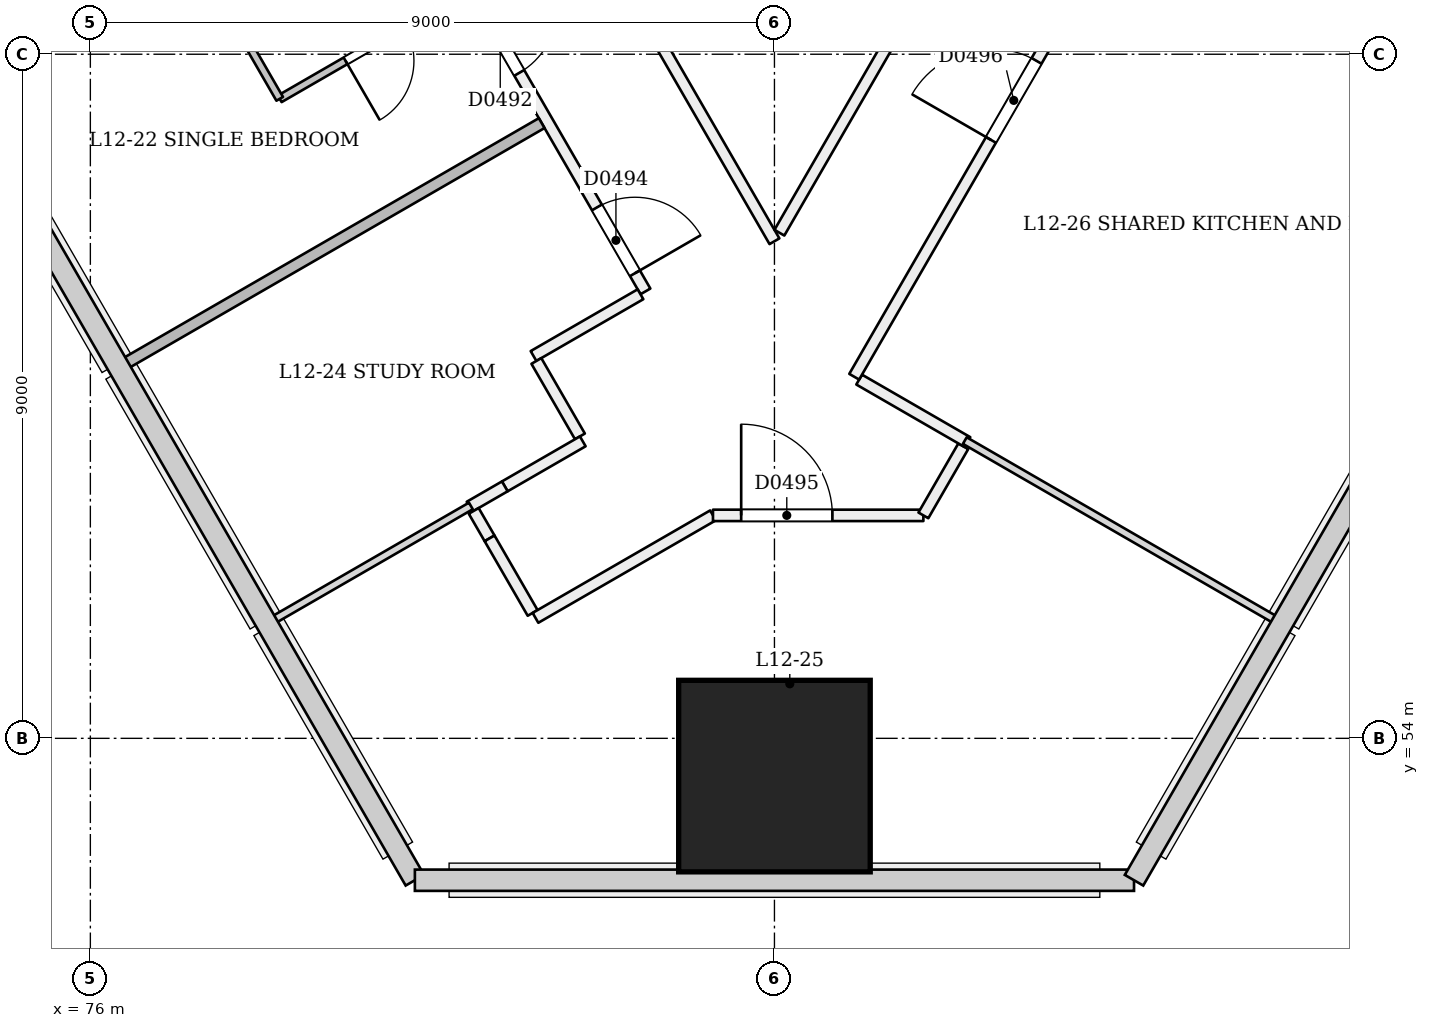
"""IFC4 building model, lengths in metres.
Left out: names, types, materials, properties, quantities, classifications, styles, units other than length and angle.
Written with IfcOpenShell. Run it as: python <this file> out.ifc"""

import sys

from ifc_helpers import new_model, si_unit, direction, frame, frame_2d, origin, origin_2d, place, context, subcontext, project, spatial, rectangle, extrude, element, fill, save


model = new_model("IFC4")
c1 = context("Model", 3, precision=1e-05, world=origin(), true_north=direction((0.0, 1.0)))
c2 = subcontext(c1, "Body", "Model", "MODEL_VIEW")
j1 = project(units=[si_unit("LENGTHUNIT", "METRE"), si_unit("PLANEANGLEUNIT", "RADIAN")], contexts=[c1])
p1 = place(None, origin())
s1 = spatial("IfcSite", under=j1, at=p1, CompositionType="ELEMENT")
p2 = place(p1, origin())
s2 = spatial("IfcBuilding", under=s1, at=p2, CompositionType="ELEMENT")
p3 = place(p2, frame((0.0, 0.0, 52.2)))
s3 = spatial("IfcBuildingStorey", under=s2, at=p3, CompositionType="ELEMENT", Elevation=52.2)
p4 = place(p3, frame((85.0, 53.433, 0.0), z_axis=(0.0, 0.058356907999, 0.998295783467), x_axis=(-1.0, 0.0, 0.0)))
e1 = element("IfcColumn", 1, at=p4, inside=s3, PredefinedType="COLUMN", context=c2, shape_type="SweptSolid", body=[
    extrude(rectangle(XDim=2.52, YDim=2.52, at=origin_2d()), origin(), (0.0, 0.0, 1.0), 3.606),
])
p5 = place(p3, frame((64.002, 93.308, 0.0), z_axis=(0.0, 0.0, 1.0), x_axis=(0.49999948646, -0.866025700277, 0.0)))
e2 = element("IfcWall", 2, at=p5, inside=s3, PredefinedType="PARTITIONING", context=c2, shape_type="SweptSolid", body=[
    extrude(rectangle(XDim=38.6, YDim=0.15, at=frame_2d((19.3, 0.0))), origin(), (0.0, 0.0, 1.0), 2.7),
])
p6 = place(p5, frame((0.605, 0.0, 0.0)))
e3 = element("IfcOpeningElement", 3, at=p6, cuts=e2, PredefinedType="OPENING", context=c2, shape_type="SweptSolid", body=[
    extrude(rectangle(XDim=1.0, YDim=2.1, at=frame_2d((0.5, 1.05))), frame((0.0, 0.085, 0.0), z_axis=(0.0, -1.0, 0.0), x_axis=(1.0, 0.0, 0.0)), (0.0, 0.0, 1.0), 0.171),
])
p7 = place(p5, frame((7.28, 0.0, 0.0)))
e4 = element("IfcOpeningElement", 4, at=p7, cuts=e2, PredefinedType="OPENING", context=c2, shape_type="SweptSolid", body=[
    extrude(rectangle(XDim=1.0, YDim=2.1, at=frame_2d((0.5, 1.05))), frame((0.0, 0.085, 0.0), z_axis=(0.0, -1.0, 0.0), x_axis=(1.0, 0.0, 0.0)), (0.0, 0.0, 1.0), 0.171),
])
p8 = place(p5, frame((9.72, 0.0, 0.0)))
e5 = element("IfcOpeningElement", 5, at=p8, cuts=e2, PredefinedType="OPENING", context=c2, shape_type="SweptSolid", body=[
    extrude(rectangle(XDim=1.0, YDim=2.1, at=frame_2d((0.5, 1.05))), frame((0.0, 0.085, 0.0), z_axis=(0.0, -1.0, 0.0), x_axis=(1.0, 0.0, 0.0)), (0.0, 0.0, 1.0), 0.171),
])
p9 = place(p5, frame((16.395, 0.0, 0.0)))
e6 = element("IfcOpeningElement", 6, at=p9, cuts=e2, PredefinedType="OPENING", context=c2, shape_type="SweptSolid", body=[
    extrude(rectangle(XDim=1.0, YDim=2.1, at=frame_2d((0.5, 1.05))), frame((0.0, 0.085, 0.0), z_axis=(0.0, -1.0, 0.0), x_axis=(1.0, 0.0, 0.0)), (0.0, 0.0, 1.0), 0.171),
])
p10 = place(p5, frame((18.72, 0.0, 0.0)))
e7 = element("IfcOpeningElement", 7, at=p10, cuts=e2, PredefinedType="OPENING", context=c2, shape_type="SweptSolid", body=[
    extrude(rectangle(XDim=1.0, YDim=2.1, at=frame_2d((0.5, 1.05))), frame((0.0, 0.085, 0.0), z_axis=(0.0, -1.0, 0.0), x_axis=(1.0, 0.0, 0.0)), (0.0, 0.0, 1.0), 0.171),
])
p11 = place(p5, frame((25.395, 0.0, 0.0)))
e8 = element("IfcOpeningElement", 8, at=p11, cuts=e2, PredefinedType="OPENING", context=c2, shape_type="SweptSolid", body=[
    extrude(rectangle(XDim=1.0, YDim=2.1, at=frame_2d((0.5, 1.05))), frame((0.0, 0.085, 0.0), z_axis=(0.0, -1.0, 0.0), x_axis=(1.0, 0.0, 0.0)), (0.0, 0.0, 1.0), 0.171),
])
p12 = place(p5, frame((27.605, 0.0, 0.0)))
e9 = element("IfcOpeningElement", 9, at=p12, cuts=e2, PredefinedType="OPENING", context=c2, shape_type="SweptSolid", body=[
    extrude(rectangle(XDim=1.0, YDim=2.1, at=frame_2d((0.5, 1.05))), frame((0.0, 0.085, 0.0), z_axis=(0.0, -1.0, 0.0), x_axis=(1.0, 0.0, 0.0)), (0.0, 0.0, 1.0), 0.171),
])
p13 = place(p5, frame((34.28, 0.0, 0.0)))
e10 = element("IfcOpeningElement", 10, at=p13, cuts=e2, PredefinedType="OPENING", context=c2, shape_type="SweptSolid", body=[
    extrude(rectangle(XDim=1.0, YDim=2.1, at=frame_2d((0.5, 1.05))), frame((0.0, 0.085, 0.0), z_axis=(0.0, -1.0, 0.0), x_axis=(1.0, 0.0, 0.0)), (0.0, 0.0, 1.0), 0.171),
])
p14 = place(p5, frame((37.324, 0.0, 0.0)))
e11 = element("IfcOpeningElement", 11, at=p14, cuts=e2, PredefinedType="OPENING", context=c2, shape_type="SweptSolid", body=[
    extrude(rectangle(XDim=1.0, YDim=2.1, at=frame_2d((0.5, 1.05))), frame((0.0, 0.085, 0.0), z_axis=(0.0, -1.0, 0.0), x_axis=(1.0, 0.0, 0.0)), (0.0, 0.0, 1.0), 0.171),
])
p15 = place(p3, frame((83.238, 59.842, 0.0), z_axis=(0.0, 0.0, 1.0), x_axis=(-0.866015446554, -0.500017246033, 0.0)))
e12 = element("IfcWall", 12, at=p15, inside=s3, PredefinedType="PARTITIONING", context=c2, shape_type="SweptSolid", body=[
    extrude(rectangle(XDim=1.625, YDim=0.15, at=frame_2d((0.812, 0.0))), origin(), (0.0, 0.0, 1.0), 3.1),
])
p16 = place(p3, frame((81.868, 58.965, 0.0), z_axis=(0.0, 0.0, 1.0), x_axis=(0.499919131929, -0.866072087953, 0.0)))
e13 = element("IfcWall", 13, at=p16, inside=s3, PredefinedType="PARTITIONING", context=c2, shape_type="SweptSolid", body=[
    extrude(rectangle(XDim=1.146, YDim=0.15, at=frame_2d((0.573, 0.0))), origin(), (0.0, 0.0, 1.0), 3.1),
])
p17 = place(p3, frame((82.478, 57.907, 0.0), z_axis=(0.0, 0.0, 1.0), x_axis=(-0.866079219153, -0.49990677746, 0.0)))
e14 = element("IfcWall", 14, at=p17, inside=s3, PredefinedType="PARTITIONING", context=c2, shape_type="SweptSolid", body=[
    extrude(rectangle(XDim=1.185, YDim=0.15, at=frame_2d((0.592, 0.0))), origin(), (0.0, 0.0, 1.0), 3.1),
])
p18 = place(p3, frame((81.452, 57.315, 0.0), z_axis=(0.0, 0.0, 1.0), x_axis=(-0.865988023682, -0.500064738649, 0.0)))
e15 = element("IfcWall", 15, at=p18, inside=s3, PredefinedType="PARTITIONING", context=c2, shape_type="SweptSolid", body=[
    extrude(rectangle(XDim=0.535, YDim=0.15, at=frame_2d((0.268, 0.0))), origin(), (0.0, 0.0, 1.0), 2.6),
])
p19 = place(p3, frame((81.044, 56.992, 0.0), z_axis=(0.0, 0.0, 1.0), x_axis=(0.499790003975, -0.866146611104, 0.0)))
e16 = element("IfcWall", 16, at=p19, inside=s3, PredefinedType="PARTITIONING", context=c2, shape_type="SweptSolid", body=[
    extrude(rectangle(XDim=0.417, YDim=0.15, at=frame_2d((0.208, 0.0))), origin(), (0.0, 0.0, 1.0), 2.6),
])
p20 = place(p3, frame((81.252, 56.631, 0.0), z_axis=(0.0, 0.0, 1.0), x_axis=(0.500033399229, -0.866006119872, 0.0)))
e17 = element("IfcWall", 17, at=p20, inside=s3, PredefinedType="PARTITIONING", context=c2, shape_type="SweptSolid", body=[
    extrude(rectangle(XDim=1.133, YDim=0.15, at=frame_2d((0.566, 0.0))), origin(), (0.0, 0.0, 1.0), 3.1),
])
p21 = place(p3, frame((81.856, 55.585, 0.0), z_axis=(0.0, 0.0, 1.0), x_axis=(0.866016698225, 0.500015078168, 0.0)))
e18 = element("IfcWall", 18, at=p21, inside=s3, PredefinedType="PARTITIONING", context=c2, shape_type="SweptSolid", body=[
    extrude(rectangle(XDim=2.696, YDim=0.15, at=frame_2d((1.348, 0.0))), origin(), (0.0, 0.0, 1.0), 2.6),
])
p22 = place(p3, frame((84.191, 56.933, 0.0), z_axis=(0.0, 0.0, 1.0), x_axis=(1.0, 0.0, 0.0)))
e19 = element("IfcWall", 19, at=p22, inside=s3, PredefinedType="PARTITIONING", context=c2, shape_type="SweptSolid", body=[
    extrude(rectangle(XDim=2.768, YDim=0.15, at=frame_2d((1.384, 0.0))), origin(), (0.0, 0.0, 1.0), 3.1),
])
p23 = place(p22, frame((0.371, 0.0, 0.0)))
e20 = element("IfcOpeningElement", 20, at=p23, cuts=e19, PredefinedType="OPENING", context=c2, shape_type="SweptSolid", body=[
    extrude(rectangle(XDim=1.2, YDim=2.1, at=frame_2d((0.6, 1.05))), frame((0.0, 0.085, 0.0), z_axis=(0.0, -1.0, 0.0), x_axis=(1.0, 0.0, 0.0)), (0.0, 0.0, 1.0), 0.171),
])
p24 = place(p3, frame((86.959, 56.933, 0.0), z_axis=(0.0, 0.0, 1.0), x_axis=(0.500091574638, 0.865972526687, 0.0)))
e21 = element("IfcWall", 21, at=p24, inside=s3, PredefinedType="PARTITIONING", context=c2, shape_type="SweptSolid", body=[
    extrude(rectangle(XDim=1.05, YDim=0.15, at=frame_2d((0.525, 0.0))), origin(), (0.0, 0.0, 1.0), 3.1),
])
p25 = place(p3, frame((87.539, 57.897, 0.0), z_axis=(0.0, 0.0, 1.0), x_axis=(-0.866015045157, 0.50001794124, 0.0)))
e22 = element("IfcWall", 22, at=p25, inside=s3, PredefinedType="PARTITIONING", context=c2, shape_type="SweptSolid", body=[
    extrude(rectangle(XDim=1.645, YDim=0.15, at=frame_2d((0.823, 0.0))), origin(), (0.0, 0.0, 1.0), 3.1),
])
p26 = place(p3, frame((86.05, 58.757, 0.0), z_axis=(0.0, 0.0, 1.0), x_axis=(0.499999296855, 0.866025809745, 0.0)))
e23 = element("IfcWall", 23, at=p26, inside=s3, PredefinedType="PARTITIONING", context=c2, shape_type="SweptSolid", body=[
    extrude(rectangle(XDim=43.792, YDim=0.15, at=frame_2d((21.896, 0.0))), origin(), (0.0, 0.0, 1.0), 2.7),
])
p27 = place(p26, frame((3.598, 0.0, 0.0)))
e24 = element("IfcOpeningElement", 24, at=p27, cuts=e23, PredefinedType="OPENING", context=c2, shape_type="SweptSolid", body=[
    extrude(rectangle(XDim=1.2, YDim=2.1, at=frame_2d((0.6, 1.05))), frame((0.0, 0.085, 0.0), z_axis=(0.0, -1.0, 0.0), x_axis=(1.0, 0.0, 0.0)), (0.0, 0.0, 1.0), 0.171),
])
p28 = place(p26, frame((11.176, 0.0, 0.0)))
e25 = element("IfcOpeningElement", 25, at=p28, cuts=e23, PredefinedType="OPENING", context=c2, shape_type="SweptSolid", body=[
    extrude(rectangle(XDim=1.0, YDim=2.1, at=frame_2d((0.5, 1.05))), frame((0.0, 0.085, 0.0), z_axis=(0.0, -1.0, 0.0), x_axis=(1.0, 0.0, 0.0)), (0.0, 0.0, 1.0), 0.171),
])
p29 = place(p26, frame((13.616, 0.0, 0.0)))
e26 = element("IfcOpeningElement", 26, at=p29, cuts=e23, PredefinedType="OPENING", context=c2, shape_type="SweptSolid", body=[
    extrude(rectangle(XDim=1.0, YDim=2.1, at=frame_2d((0.5, 1.05))), frame((0.0, 0.085, 0.0), z_axis=(0.0, -1.0, 0.0), x_axis=(1.0, 0.0, 0.0)), (0.0, 0.0, 1.0), 0.171),
])
p30 = place(p26, frame((20.176, 0.0, 0.0)))
e27 = element("IfcOpeningElement", 27, at=p30, cuts=e23, PredefinedType="OPENING", context=c2, shape_type="SweptSolid", body=[
    extrude(rectangle(XDim=1.0, YDim=2.1, at=frame_2d((0.5, 1.05))), frame((0.0, 0.085, 0.0), z_axis=(0.0, -1.0, 0.0), x_axis=(1.0, 0.0, 0.0)), (0.0, 0.0, 1.0), 0.171),
])
p31 = place(p26, frame((22.616, 0.0, 0.0)))
e28 = element("IfcOpeningElement", 28, at=p31, cuts=e23, PredefinedType="OPENING", context=c2, shape_type="SweptSolid", body=[
    extrude(rectangle(XDim=1.0, YDim=2.1, at=frame_2d((0.5, 1.05))), frame((0.0, 0.085, 0.0), z_axis=(0.0, -1.0, 0.0), x_axis=(1.0, 0.0, 0.0)), (0.0, 0.0, 1.0), 0.171),
])
p32 = place(p26, frame((29.176, 0.0, 0.0)))
e29 = element("IfcOpeningElement", 29, at=p32, cuts=e23, PredefinedType="OPENING", context=c2, shape_type="SweptSolid", body=[
    extrude(rectangle(XDim=1.0, YDim=2.1, at=frame_2d((0.5, 1.05))), frame((0.0, 0.085, 0.0), z_axis=(0.0, -1.0, 0.0), x_axis=(1.0, 0.0, 0.0)), (0.0, 0.0, 1.0), 0.171),
])
p33 = place(p26, frame((31.616, 0.0, 0.0)))
e30 = element("IfcOpeningElement", 30, at=p33, cuts=e23, PredefinedType="OPENING", context=c2, shape_type="SweptSolid", body=[
    extrude(rectangle(XDim=1.0, YDim=2.1, at=frame_2d((0.5, 1.05))), frame((0.0, 0.085, 0.0), z_axis=(0.0, -1.0, 0.0), x_axis=(1.0, 0.0, 0.0)), (0.0, 0.0, 1.0), 0.171),
])
p34 = place(p26, frame((38.176, 0.0, 0.0)))
e31 = element("IfcOpeningElement", 31, at=p34, cuts=e23, PredefinedType="OPENING", context=c2, shape_type="SweptSolid", body=[
    extrude(rectangle(XDim=1.0, YDim=2.1, at=frame_2d((0.5, 1.05))), frame((0.0, 0.085, 0.0), z_axis=(0.0, -1.0, 0.0), x_axis=(1.0, 0.0, 0.0)), (0.0, 0.0, 1.0), 0.171),
])
p35 = place(p26, frame((41.344, 0.0, 0.0)))
e32 = element("IfcOpeningElement", 32, at=p35, cuts=e23, PredefinedType="OPENING", context=c2, shape_type="SweptSolid", body=[
    extrude(rectangle(XDim=1.0, YDim=2.1, at=frame_2d((0.5, 1.05))), frame((0.0, 0.085, 0.0), z_axis=(0.0, -1.0, 0.0), x_axis=(1.0, 0.0, 0.0)), (0.0, 0.0, 1.0), 0.171),
])
p36 = place(p3, frame((85.0, 60.54, 0.0), z_axis=(0.0, 0.0, 1.0), x_axis=(-0.500000084694, 0.866025354886, 0.0)))
e33 = element("IfcWall", 33, at=p36, inside=s3, PredefinedType="PARTITIONING", context=c2, shape_type="SweptSolid", body=[
    extrude(rectangle(XDim=34.711, YDim=0.15, at=frame_2d((17.355, 0.0))), origin(), (0.0, 0.0, 1.0), 3.1),
])
p37 = place(p36, frame((5.966, 0.0, 0.0)))
e34 = element("IfcOpeningElement", 34, at=p37, cuts=e33, PredefinedType="OPENING", context=c2, shape_type="SweptSolid", body=[
    extrude(rectangle(XDim=1.2, YDim=2.1, at=frame_2d((0.6, 1.05))), frame((0.0, 0.085, 0.0), z_axis=(0.0, -1.0, 0.0), x_axis=(1.0, 0.0, 0.0)), (0.0, 0.0, 1.0), 0.171),
])
p38 = place(p36, frame((11.813, 0.0, 0.0)))
e35 = element("IfcOpeningElement", 35, at=p38, cuts=e33, PredefinedType="OPENING", context=c2, shape_type="SweptSolid", body=[
    extrude(rectangle(XDim=1.2, YDim=2.1, at=frame_2d((0.6, 1.05))), frame((0.0, 0.085, 0.0), z_axis=(0.0, -1.0, 0.0), x_axis=(1.0, 0.0, 0.0)), (0.0, 0.0, 1.0), 0.171),
])
p39 = place(p36, frame((25.156, 0.0, 0.0)))
e36 = element("IfcOpeningElement", 36, at=p39, cuts=e33, PredefinedType="OPENING", context=c2, shape_type="SweptSolid", body=[
    extrude(rectangle(XDim=1.2, YDim=2.1, at=frame_2d((0.6, 1.05))), frame((0.0, 0.085, 0.0), z_axis=(0.0, -1.0, 0.0), x_axis=(1.0, 0.0, 0.0)), (0.0, 0.0, 1.0), 0.171),
])
p40 = place(p36, frame((30.288, 0.0, 0.0)))
e37 = element("IfcOpeningElement", 37, at=p40, cuts=e33, PredefinedType="OPENING", context=c2, shape_type="SweptSolid", body=[
    extrude(rectangle(XDim=1.2, YDim=2.1, at=frame_2d((0.6, 1.05))), frame((0.0, 0.085, 0.0), z_axis=(0.0, -1.0, 0.0), x_axis=(1.0, 0.0, 0.0)), (0.0, 0.0, 1.0), 0.171),
])
p41 = place(p36, frame((15.887, 0.0, 0.0)))
e38 = element("IfcOpeningElement", 38, at=p41, cuts=e33, PredefinedType="OPENING", context=c2, shape_type="SweptSolid", body=[
    extrude(rectangle(XDim=1.2, YDim=2.1, at=frame_2d((0.6, 1.05))), frame((0.0, 0.085, 0.0), z_axis=(0.0, -1.0, 0.0), x_axis=(1.0, 0.0, 0.0)), (0.0, 0.0, 1.0), 0.171),
])
p42 = place(p36, frame((19.777, 0.0, 0.0)))
e39 = element("IfcOpeningElement", 39, at=p42, cuts=e33, PredefinedType="OPENING", context=c2, shape_type="SweptSolid", body=[
    extrude(rectangle(XDim=1.2, YDim=2.1, at=frame_2d((0.6, 1.05))), frame((0.0, 0.085, 0.0), z_axis=(0.0, -1.0, 0.0), x_axis=(1.0, 0.0, 0.0)), (0.0, 0.0, 1.0), 0.171),
])
p43 = place(p3, frame((102.355, 90.6, 0.0), z_axis=(0.0, 0.0, 1.0), x_axis=(-0.500000924128, -0.866024870238, 0.0)))
e40 = element("IfcWall", 40, at=p43, inside=s3, PredefinedType="PARTITIONING", context=c2, shape_type="SweptSolid", body=[
    extrude(rectangle(XDim=34.581, YDim=0.15, at=frame_2d((17.291, 0.0))), origin(), (0.0, 0.0, 1.0), 3.1),
])
p44 = place(p43, frame((9.118, 0.0, 0.0)))
e41 = element("IfcOpeningElement", 41, at=p44, cuts=e40, PredefinedType="OPENING", context=c2, shape_type="SweptSolid", body=[
    extrude(rectangle(XDim=1.2, YDim=2.1, at=frame_2d((0.6, 1.05))), frame((0.0, 0.085, 0.0), z_axis=(0.0, -1.0, 0.0), x_axis=(1.0, 0.0, 0.0)), (0.0, 0.0, 1.0), 0.171),
])
p45 = place(p3, frame((74.21, 62.828, 0.0), z_axis=(0.0, 0.0, 1.0), x_axis=(0.866007273829, 0.50003140069, 0.0)))
e42 = element("IfcWall", 42, at=p45, inside=s3, PredefinedType="PARTITIONING", context=c2, shape_type="SweptSolid", body=[
    extrude(rectangle(XDim=3.42, YDim=0.15, at=frame_2d((1.71, 0.0))), origin(), (0.0, 0.0, 1.0), 2.6),
])
p46 = place(p3, frame((80.938, 63.826, 0.0), z_axis=(0.0, 0.0, 1.0), x_axis=(-0.866011447264, -0.500024172624, 0.0)))
e43 = element("IfcWall", 43, at=p46, inside=s3, PredefinedType="PARTITIONING", context=c2, shape_type="SweptSolid", body=[
    extrude(rectangle(XDim=2.825, YDim=0.1, at=frame_2d((1.413, 0.0))), origin(), (0.0, 0.0, 1.0), 3.1),
])
p47 = place(p46, frame((0.925, 0.0, 0.0)))
e44 = element("IfcOpeningElement", 44, at=p47, cuts=e43, PredefinedType="OPENING", context=c2, shape_type="SweptSolid", body=[
    extrude(rectangle(XDim=0.9, YDim=2.1, at=frame_2d((0.45, 1.05))), frame((0.0, 0.061, 0.0), z_axis=(0.0, -1.0, 0.0), x_axis=(1.0, 0.0, 0.0)), (0.0, 0.0, 1.0), 0.121),
])
p48 = place(p3, frame((78.491, 62.413, 0.0), z_axis=(0.0, 0.0, 1.0), x_axis=(-0.500004234368, 0.866022959057, 0.0)))
e45 = element("IfcWall", 45, at=p48, inside=s3, PredefinedType="PARTITIONING", context=c2, shape_type="SweptSolid", body=[
    extrude(rectangle(XDim=2.5, YDim=0.1, at=frame_2d((1.25, 0.0))), origin(), (0.0, 0.0, 1.0), 2.7),
])
p49 = place(p3, frame((76.442, 58.921, 0.0), z_axis=(0.0, 0.0, 1.0), x_axis=(0.866025401434, 0.500000004071, 0.0)))
e46 = element("IfcWall", 46, at=p49, inside=s3, PredefinedType="PARTITIONING", context=c2, shape_type="SweptSolid", body=[
    extrude(rectangle(XDim=6.345, YDim=0.15, at=frame_2d((3.173, 0.0))), origin(), (0.0, 0.0, 1.0), 2.6),
])
p50 = place(p3, frame((78.39, 55.547, 0.0), z_axis=(0.0, 0.0, 1.0), x_axis=(0.866015980925, 0.500016320516, 0.0)))
e47 = element("IfcWall", 47, at=p50, inside=s3, PredefinedType="PARTITIONING", context=c2, shape_type="SweptSolid", body=[
    extrude(rectangle(XDim=3.021, YDim=0.1, at=frame_2d((1.51, 0.0))), origin(), (0.0, 0.0, 1.0), 2.6),
])
p51 = place(p3, frame((91.61, 55.547, 0.0), z_axis=(0.0, 0.0, 1.0), x_axis=(-0.866028632512, 0.499994407638, 0.0)))
e48 = element("IfcWall", 48, at=p51, inside=s3, PredefinedType="PARTITIONING", context=c2, shape_type="SweptSolid", body=[
    extrude(rectangle(XDim=4.74, YDim=0.1, at=frame_2d((2.37, 0.0))), origin(), (0.0, 0.0, 1.0), 2.6),
])
p52 = place(p3, frame((95.79, 62.828, 0.0), z_axis=(0.0, 0.0, 1.0), x_axis=(-0.866015887322, 0.500016482634, 0.0)))
e49 = element("IfcWall", 49, at=p52, inside=s3, PredefinedType="PARTITIONING", context=c2, shape_type="SweptSolid", body=[
    extrude(rectangle(XDim=6.325, YDim=0.1, at=frame_2d((3.163, 0.0))), origin(), (0.0, 0.0, 1.0), 2.6),
])
p53 = place(p13, origin())
e50 = element("IfcDoor", 50, at=p53, inside=s3, OperationType="SINGLE_SWING_LEFT", PredefinedType="NOTDEFINED", context=c2, shape_type="SweptSolid", body=[
    extrude(rectangle(XDim=1.0, YDim=2.1, at=frame_2d((0.5, 1.05))), frame((0.0, 0.025, 0.0), z_axis=(0.0, -1.0, 0.0), x_axis=(1.0, 0.0, 0.0)), (0.0, 0.0, 1.0), 0.05),
])
fill(e10, e50)
p54 = place(p47, origin())
e51 = element("IfcDoor", 51, at=p54, inside=s3, OperationType="SINGLE_SWING_RIGHT", PredefinedType="NOTDEFINED", context=c2, shape_type="SweptSolid", body=[
    extrude(rectangle(XDim=0.9, YDim=2.1, at=frame_2d((0.45, 1.05))), frame((0.0, 0.025, 0.0), z_axis=(0.0, -1.0, 0.0), x_axis=(1.0, 0.0, 0.0)), (0.0, 0.0, 1.0), 0.05),
])
fill(e44, e51)
p55 = place(p14, origin())
e52 = element("IfcDoor", 52, at=p55, inside=s3, OperationType="SINGLE_SWING_RIGHT", PredefinedType="NOTDEFINED", context=c2, shape_type="SweptSolid", body=[
    extrude(rectangle(XDim=1.0, YDim=2.1, at=frame_2d((0.5, 1.05))), frame((0.0, 0.025, 0.0), z_axis=(0.0, -1.0, 0.0), x_axis=(1.0, 0.0, 0.0)), (0.0, 0.0, 1.0), 0.05),
])
fill(e11, e52)
p56 = place(p23, origin())
e53 = element("IfcDoor", 53, at=p56, inside=s3, OperationType="SINGLE_SWING_LEFT", PredefinedType="NOTDEFINED", context=c2, shape_type="SweptSolid", body=[
    extrude(rectangle(XDim=1.2, YDim=2.1, at=frame_2d((0.6, 1.05))), frame((0.0, 0.025, 0.0), z_axis=(0.0, -1.0, 0.0), x_axis=(1.0, 0.0, 0.0)), (0.0, 0.0, 1.0), 0.05),
])
fill(e20, e53)
p57 = place(p27, origin())
e54 = element("IfcDoor", 54, at=p57, inside=s3, OperationType="SINGLE_SWING_LEFT", PredefinedType="NOTDEFINED", context=c2, shape_type="SweptSolid", body=[
    extrude(rectangle(XDim=1.2, YDim=2.1, at=frame_2d((0.6, 1.05))), frame((0.0, 0.025, 0.0), z_axis=(0.0, -1.0, 0.0), x_axis=(1.0, 0.0, 0.0)), (0.0, 0.0, 1.0), 0.05),
])
fill(e24, e54)
save(model, sys.argv[1])
